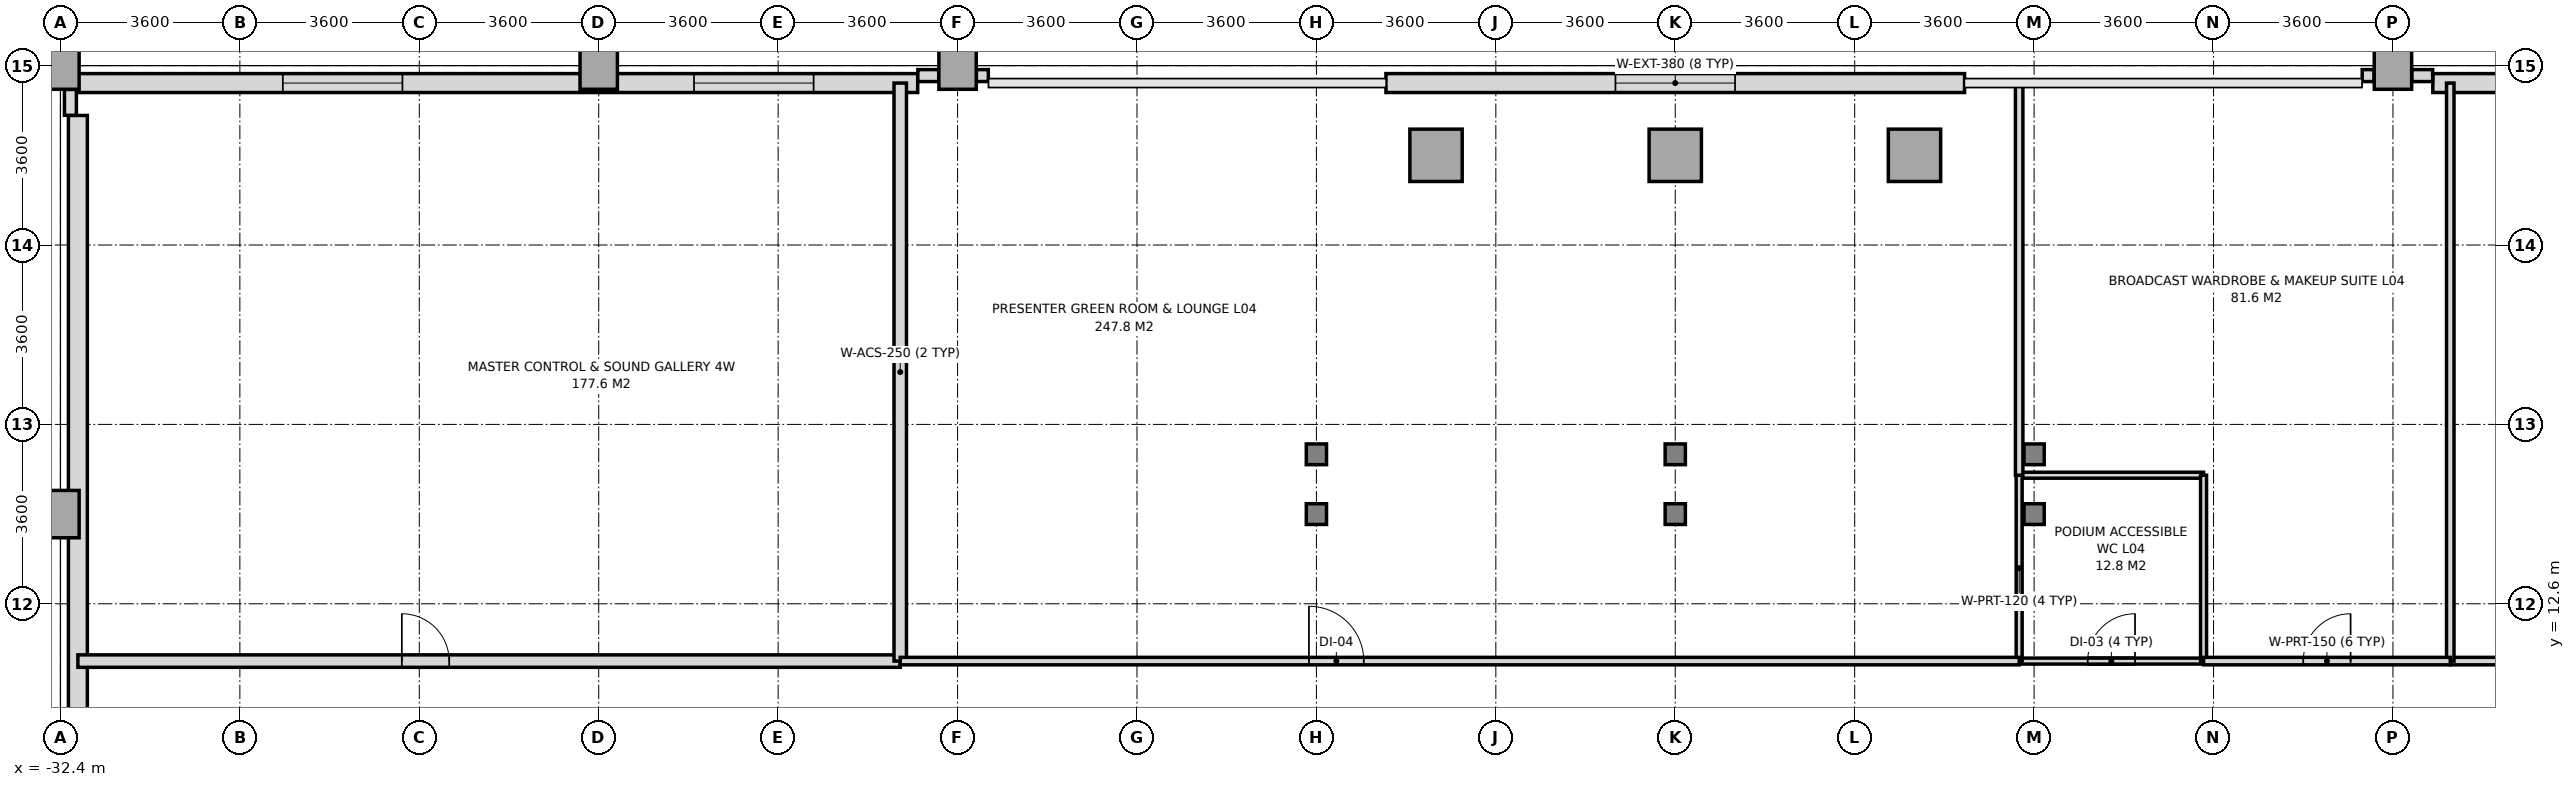
"""IFC4 building model, lengths in metres.
Left out: names, types, materials, properties, quantities, classifications, styles, units other than length and angle.
Written with IfcOpenShell. Run it as: python <this file> out.ifc"""

import sys

from ifc_helpers import new_model, si_unit, direction, frame, frame_2d, origin, origin_2d, place, context, subcontext, project, spatial, rectangle, i_section, extrude, source, transform, mapped, element, fill, save


model = new_model("IFC4")
c1 = context("Model", 3, precision=1e-05, world=origin(), true_north=direction((0.0, 1.0)))
c2 = subcontext(c1, "Body", "Model", "MODEL_VIEW")
j1 = project(units=[si_unit("LENGTHUNIT", "METRE"), si_unit("PLANEANGLEUNIT", "RADIAN")], contexts=[c1])
p1 = place(None, origin())
s1 = spatial("IfcSite", under=j1, at=p1, CompositionType="ELEMENT")
p2 = place(p1, origin())
s2 = spatial("IfcBuilding", under=s1, at=p2, CompositionType="ELEMENT")
p3 = place(p2, frame((0.0, 0.0, 20.4)))
s3 = spatial("IfcBuildingStorey", under=s2, at=p3, CompositionType="ELEMENT", Elevation=20.4)
m1 = source(origin(), c2, "Body", "SweptSolid", [
    extrude(rectangle(XDim=0.75, YDim=0.95, at=origin_2d()), origin(), (0.0, 0.0, 1.0), 4.48),
])
for number, where, z_axis, x_axis in (
    (1, (-32.4, 14.4, 0.0), (0.0, 0.0, 1.0), (1.0, 0.0, 0.0)),
    (2, (-32.4, 23.4, 0.0), (0.0, 0.0, 1.0), (1.0, 0.0, 0.0)),
    (3, (-21.6, 23.4, 0.0), (0.0, 0.0, 1.0), (1.0, 0.0, 0.0)),
    (4, (-14.4, 23.4, 0.0), (0.0, 0.0, 1.0), (1.0, 0.0, 0.0)),
):
    element("IfcColumn", number, at=place(p3, frame(where, z_axis=z_axis, x_axis=x_axis)), inside=s3, PredefinedType="COLUMN", context=c2, shape_type="MappedRepresentation", body=[
        mapped(m1, transform((0.0, 0.0, 0.0), x_axis=(1.0, 0.0, 0.0), y_axis=(0.0, 1.0, 0.0), z_axis=(0.0, 0.0, 1.0), scale=1.0)),
    ])
m2 = source(origin(), c2, "Body", "SweptSolid", [
    extrude(i_section(OverallWidth=0.406, OverallDepth=0.416, WebThickness=0.024, FlangeThickness=0.039, at=origin_2d()), origin(), (0.0, 0.0, 1.0), 4.48),
])
for number, where, z_axis, x_axis in (
    (5, (-7.2, 14.4, 0.0), (0.0, 0.0, 1.0), (1.0, 0.0, 0.0)),
    (6, (-7.2, 15.6, 0.0), (0.0, 0.0, 1.0), (1.0, 0.0, 0.0)),
):
    element("IfcColumn", number, at=place(p3, frame(where, z_axis=z_axis, x_axis=x_axis)), inside=s3, PredefinedType="COLUMN", context=c2, shape_type="MappedRepresentation", body=[
        mapped(m2, transform((0.0, 0.0, 0.0), x_axis=(1.0, 0.0, 0.0), y_axis=(0.0, 1.0, 0.0), z_axis=(0.0, 0.0, 1.0), scale=1.0)),
    ])
m3 = source(origin(), c2, "Body", "SweptSolid", [
    extrude(rectangle(XDim=1.05, YDim=1.05, at=origin_2d()), origin(), (0.0, 0.0, 1.0), 4.48),
])
p4 = place(p3, frame((-4.8, 21.6, 0.0), z_axis=(0.0, 0.0, 1.0), x_axis=(1.0, 0.0, 0.0)))
e7 = element("IfcColumn", 7, at=p4, inside=s3, PredefinedType="COLUMN", context=c2, shape_type="MappedRepresentation", body=[
    mapped(m3, transform((0.0, 0.0, 0.0), x_axis=(1.0, 0.0, 0.0), y_axis=(0.0, 1.0, 0.0), z_axis=(0.0, 0.0, 1.0), scale=1.0)),
])
for number, where, z_axis, x_axis in (
    (8, (0.0, 14.4, 0.0), (0.0, 0.0, 1.0), (1.0, 0.0, 0.0)),
    (9, (0.0, 15.6, 0.0), (0.0, 0.0, 1.0), (1.0, 0.0, 0.0)),
):
    element("IfcColumn", number, at=place(p3, frame(where, z_axis=z_axis, x_axis=x_axis)), inside=s3, PredefinedType="COLUMN", context=c2, shape_type="MappedRepresentation", body=[
        mapped(m2, transform((0.0, 0.0, 0.0), x_axis=(1.0, 0.0, 0.0), y_axis=(0.0, 1.0, 0.0), z_axis=(0.0, 0.0, 1.0), scale=1.0)),
    ])
for number, where, z_axis, x_axis in (
    (10, (0.0, 21.6, 0.0), (0.0, 0.0, 1.0), (1.0, 0.0, 0.0)),
    (11, (4.8, 21.6, 0.0), (0.0, 0.0, 1.0), (1.0, 0.0, 0.0)),
):
    element("IfcColumn", number, at=place(p3, frame(where, z_axis=z_axis, x_axis=x_axis)), inside=s3, PredefinedType="COLUMN", context=c2, shape_type="MappedRepresentation", body=[
        mapped(m3, transform((0.0, 0.0, 0.0), x_axis=(1.0, 0.0, 0.0), y_axis=(0.0, 1.0, 0.0), z_axis=(0.0, 0.0, 1.0), scale=1.0)),
    ])
for number, where, z_axis, x_axis in (
    (12, (7.2, 14.4, 0.0), (0.0, 0.0, 1.0), (1.0, 0.0, 0.0)),
    (13, (7.2, 15.6, 0.0), (0.0, 0.0, 1.0), (1.0, 0.0, 0.0)),
):
    element("IfcColumn", number, at=place(p3, frame(where, z_axis=z_axis, x_axis=x_axis)), inside=s3, PredefinedType="COLUMN", context=c2, shape_type="MappedRepresentation", body=[
        mapped(m2, transform((0.0, 0.0, 0.0), x_axis=(1.0, 0.0, 0.0), y_axis=(0.0, 1.0, 0.0), z_axis=(0.0, 0.0, 1.0), scale=1.0)),
    ])
p5 = place(p3, frame((14.4, 23.4, 0.0), z_axis=(0.0, 0.0, 1.0), x_axis=(1.0, 0.0, 0.0)))
e14 = element("IfcColumn", 14, at=p5, inside=s3, PredefinedType="COLUMN", context=c2, shape_type="MappedRepresentation", body=[
    mapped(m1, transform((0.0, 0.0, 0.0), x_axis=(1.0, 0.0, 0.0), y_axis=(0.0, 1.0, 0.0), z_axis=(0.0, 0.0, 1.0), scale=1.0)),
])
p6 = place(p3, frame((-32.05, 23.05, 0.0), z_axis=(0.0, 0.0, 1.0), x_axis=(1.0, 0.0, 0.0)))
e15 = element("IfcWall", 15, at=p6, inside=s3, PredefinedType="SOLIDWALL", context=c2, shape_type="SweptSolid", body=[
    extrude(rectangle(XDim=16.85, YDim=0.38, at=frame_2d((8.425, 0.0))), origin(), (0.0, 0.0, 1.0), 4.48),
])
p7 = place(p6, frame((4.112, 0.0, 0.95)))
e16 = element("IfcOpeningElement", 16, at=p7, cuts=e15, PredefinedType="OPENING", context=c2, shape_type="SweptSolid", body=[
    extrude(rectangle(XDim=2.4, YDim=2.2, at=frame_2d((1.2, 1.1))), frame((0.0, 0.2, 0.0), z_axis=(0.0, -1.0, 0.0), x_axis=(1.0, 0.0, 0.0)), (0.0, 0.0, 1.0), 0.4),
])
p8 = place(p6, frame((12.362, 0.0, 0.95)))
e17 = element("IfcOpeningElement", 17, at=p8, cuts=e15, PredefinedType="OPENING", context=c2, shape_type="SweptSolid", body=[
    extrude(rectangle(XDim=2.4, YDim=2.2, at=frame_2d((1.2, 1.1))), frame((0.0, 0.2, 0.0), z_axis=(0.0, -1.0, 0.0), x_axis=(1.0, 0.0, 0.0)), (0.0, 0.0, 1.0), 0.4),
])
p9 = place(p3, frame((15.2, 23.05, 0.0), z_axis=(0.0, 0.0, 1.0), x_axis=(1.0, 0.0, 0.0)))
e18 = element("IfcWall", 18, at=p9, inside=s3, PredefinedType="SOLIDWALL", context=c2, shape_type="SweptSolid", body=[
    extrude(rectangle(XDim=16.85, YDim=0.38, at=frame_2d((8.425, 0.0))), origin(), (0.0, 0.0, 1.0), 4.48),
])
p10 = place(p9, frame((2.088, 0.0, 0.95)))
e19 = element("IfcOpeningElement", 19, at=p10, cuts=e18, PredefinedType="OPENING", context=c2, shape_type="SweptSolid", body=[
    extrude(rectangle(XDim=2.4, YDim=2.2, at=frame_2d((1.2, 1.1))), frame((0.0, 0.2, 0.0), z_axis=(0.0, -1.0, 0.0), x_axis=(1.0, 0.0, 0.0)), (0.0, 0.0, 1.0), 0.4),
])
p11 = place(p9, frame((10.338, 0.0, 0.95)))
e20 = element("IfcOpeningElement", 20, at=p11, cuts=e18, PredefinedType="OPENING", context=c2, shape_type="SweptSolid", body=[
    extrude(rectangle(XDim=2.4, YDim=2.2, at=frame_2d((1.2, 1.1))), frame((0.0, 0.2, 0.0), z_axis=(0.0, -1.0, 0.0), x_axis=(1.0, 0.0, 0.0)), (0.0, 0.0, 1.0), 0.4),
])
p12 = place(p3, frame((-32.05, -18.8, 0.0), z_axis=(0.0, 0.0, 1.0), x_axis=(0.0, 1.0, 0.0)))
e21 = element("IfcWall", 21, at=p12, inside=s3, PredefinedType="SOLIDWALL", context=c2, shape_type="SweptSolid", body=[
    extrude(rectangle(XDim=41.2, YDim=0.38, at=frame_2d((20.6, 0.0))), origin(), (0.0, 0.0, 1.0), 4.48),
])
p13 = place(p12, frame((5.9, 0.0, 0.95)))
e22 = element("IfcOpeningElement", 22, at=p13, cuts=e21, PredefinedType="OPENING", context=c2, shape_type="SweptSolid", body=[
    extrude(rectangle(XDim=2.4, YDim=2.2, at=frame_2d((1.2, 1.1))), frame((0.0, 0.2, 0.0), z_axis=(0.0, -1.0, 0.0), x_axis=(1.0, 0.0, 0.0)), (0.0, 0.0, 1.0), 0.4),
])
p14 = place(p12, frame((13.1, 0.0, 0.95)))
e23 = element("IfcOpeningElement", 23, at=p14, cuts=e21, PredefinedType="OPENING", context=c2, shape_type="SweptSolid", body=[
    extrude(rectangle(XDim=2.4, YDim=2.2, at=frame_2d((1.2, 1.1))), frame((0.0, 0.2, 0.0), z_axis=(0.0, -1.0, 0.0), x_axis=(1.0, 0.0, 0.0)), (0.0, 0.0, 1.0), 0.4),
])
p15 = place(p12, frame((22.1, 0.0, 0.95)))
e24 = element("IfcOpeningElement", 24, at=p15, cuts=e21, PredefinedType="OPENING", context=c2, shape_type="SweptSolid", body=[
    extrude(rectangle(XDim=2.4, YDim=2.2, at=frame_2d((1.2, 1.1))), frame((0.0, 0.2, 0.0), z_axis=(0.0, -1.0, 0.0), x_axis=(1.0, 0.0, 0.0)), (0.0, 0.0, 1.0), 0.4),
])
p16 = place(p3, frame((-5.805, 23.05, 0.0), z_axis=(0.0, 0.0, 1.0), x_axis=(1.0, 0.0, 0.0)))
e25 = element("IfcWall", 25, at=p16, inside=s3, PredefinedType="SOLIDWALL", context=c2, shape_type="SweptSolid", body=[
    extrude(rectangle(XDim=11.61, YDim=0.38, at=frame_2d((5.805, 0.0))), origin(), (0.0, 0.0, 1.0), 4.48),
])
p17 = place(p16, frame((4.605, 0.0, 0.95)))
e26 = element("IfcOpeningElement", 26, at=p17, cuts=e25, PredefinedType="OPENING", context=c2, shape_type="SweptSolid", body=[
    extrude(rectangle(XDim=2.4, YDim=2.2, at=frame_2d((1.2, 1.1))), frame((0.0, 0.2, 0.0), z_axis=(0.0, -1.0, 0.0), x_axis=(1.0, 0.0, 0.0)), (0.0, 0.0, 1.0), 0.4),
])
p18 = place(p3, frame((-32.2, 22.403, 0.0), z_axis=(0.0, 0.0, 1.0), x_axis=(0.0, 1.0, 0.0)))
e27 = element("IfcWall", 27, at=p18, inside=s3, PredefinedType="PARAPET", context=c2, shape_type="SweptSolid", body=[
    extrude(rectangle(XDim=0.519, YDim=0.24, at=frame_2d((0.26, 0.0))), origin(), (0.0, 0.0, 1.0), 1.15),
])
p19 = place(p3, frame((-15.197, 23.2, 0.0), z_axis=(0.0, 0.0, 1.0), x_axis=(1.0, 0.0, 0.0)))
e28 = element("IfcWall", 28, at=p19, inside=s3, PredefinedType="PARAPET", context=c2, shape_type="SweptSolid", body=[
    extrude(rectangle(XDim=0.419, YDim=0.24, at=frame_2d((0.209, 0.0))), origin(), (0.0, 0.0, 1.0), 1.15),
])
for number, where, z_axis, x_axis in (
    (29, (-14.022, 23.2, 0.0), (0.0, 0.0, 1.0), (1.0, 0.0, 0.0)),
    (30, (13.783, 23.2, 0.0), (0.0, 0.0, 1.0), (1.0, 0.0, 0.0)),
):
    element("IfcWall", number, at=place(p3, frame(where, z_axis=z_axis, x_axis=x_axis)), inside=s3, PredefinedType="PARAPET", context=c2, shape_type="SweptSolid", body=[
        extrude(rectangle(XDim=0.239, YDim=0.24, at=frame_2d((0.12, 0.0))), origin(), (0.0, 0.0, 1.0), 1.15),
    ])
p20 = place(p3, frame((14.778, 23.2, 0.0), z_axis=(0.0, 0.0, 1.0), x_axis=(1.0, 0.0, 0.0)))
e31 = element("IfcWall", 31, at=p20, inside=s3, PredefinedType="PARAPET", context=c2, shape_type="SweptSolid", body=[
    extrude(rectangle(XDim=0.419, YDim=0.24, at=frame_2d((0.209, 0.0))), origin(), (0.0, 0.0, 1.0), 1.15),
])
p21 = place(p3, frame((6.9, 11.45, 0.0), z_axis=(0.0, 0.0, 1.0), x_axis=(1.0, 0.0, 0.0)))
e32 = element("IfcWall", 32, at=p21, inside=s3, PredefinedType="PARTITIONING", context=c2, shape_type="SweptSolid", body=[
    extrude(rectangle(XDim=3.7, YDim=0.12, at=frame_2d((1.85, 0.0))), origin(), (0.0, 0.0, 1.0), 4.48),
])
p22 = place(p21, frame((1.375, 0.0, 0.0)))
e33 = element("IfcOpeningElement", 33, at=p22, cuts=e32, PredefinedType="OPENING", context=c2, shape_type="SweptSolid", body=[
    extrude(rectangle(XDim=0.95, YDim=2.15, at=frame_2d((0.475, 1.075))), frame((0.0, 0.07, 0.0), z_axis=(0.0, -1.0, 0.0), x_axis=(1.0, 0.0, 0.0)), (0.0, 0.0, 1.0), 0.14),
])
p23 = place(p3, frame((6.9, 15.18, 0.0), z_axis=(0.0, 0.0, 1.0), x_axis=(1.0, 0.0, 0.0)))
e34 = element("IfcWall", 34, at=p23, inside=s3, PredefinedType="PARTITIONING", context=c2, shape_type="SweptSolid", body=[
    extrude(rectangle(XDim=3.7, YDim=0.12, at=frame_2d((1.85, 0.0))), origin(), (0.0, 0.0, 1.0), 3.13),
])
p24 = place(p3, frame((6.9, 11.45, 0.0), z_axis=(0.0, 0.0, 1.0), x_axis=(0.0, 1.0, 0.0)))
e35 = element("IfcWall", 35, at=p24, inside=s3, PredefinedType="PARTITIONING", context=c2, shape_type="SweptSolid", body=[
    extrude(rectangle(XDim=3.73, YDim=0.12, at=frame_2d((1.865, 0.0))), origin(), (0.0, 0.0, 1.0), 3.13),
])
p25 = place(p3, frame((10.6, 11.45, 0.0), z_axis=(0.0, 0.0, 1.0), x_axis=(0.0, 1.0, 0.0)))
e36 = element("IfcWall", 36, at=p25, inside=s3, PredefinedType="PARTITIONING", context=c2, shape_type="SweptSolid", body=[
    extrude(rectangle(XDim=3.73, YDim=0.12, at=frame_2d((1.865, 0.0))), origin(), (0.0, 0.0, 1.0), 4.48),
])
p26 = place(p3, frame((-32.05, 11.45, 0.0), z_axis=(0.0, 0.0, 1.0), x_axis=(1.0, 0.0, 0.0)))
e37 = element("IfcWall", 37, at=p26, inside=s3, PredefinedType="SOLIDWALL", context=c2, shape_type="SweptSolid", body=[
    extrude(rectangle(XDim=16.5, YDim=0.25, at=frame_2d((8.25, 0.0))), origin(), (0.0, 0.0, 1.0), 4.48),
])
p27 = place(p26, frame((6.5, 0.0, 0.0)))
e38 = element("IfcOpeningElement", 38, at=p27, cuts=e37, PredefinedType="OPENING", context=c2, shape_type="SweptSolid", body=[
    extrude(rectangle(XDim=0.95, YDim=2.15, at=frame_2d((0.475, 1.075))), frame((0.0, 0.135, 0.0), z_axis=(0.0, -1.0, 0.0), x_axis=(1.0, 0.0, 0.0)), (0.0, 0.0, 1.0), 0.27),
])
p28 = place(p3, frame((-15.55, 11.45, 0.0), z_axis=(0.0, 0.0, 1.0), x_axis=(0.0, 1.0, 0.0)))
e39 = element("IfcWall", 39, at=p28, inside=s3, PredefinedType="SOLIDWALL", context=c2, shape_type="SweptSolid", body=[
    extrude(rectangle(XDim=11.6, YDim=0.25, at=frame_2d((5.8, 0.0))), origin(), (0.0, 0.0, 1.0), 4.48),
])
p29 = place(p3, frame((15.55, 11.45, 0.0), z_axis=(0.0, 0.0, 1.0), x_axis=(1.0, 0.0, 0.0)))
e40 = element("IfcWall", 40, at=p29, inside=s3, PredefinedType="PARTITIONING", context=c2, shape_type="SweptSolid", body=[
    extrude(rectangle(XDim=16.5, YDim=0.15, at=frame_2d((8.25, 0.0))), origin(), (0.0, 0.0, 1.0), 4.48),
])
p30 = place(p29, frame((6.5, 0.0, 0.0)))
e41 = element("IfcOpeningElement", 41, at=p30, cuts=e40, PredefinedType="OPENING", context=c2, shape_type="SweptSolid", body=[
    extrude(rectangle(XDim=0.95, YDim=2.15, at=frame_2d((0.475, 1.075))), frame((0.0, 0.085, 0.0), z_axis=(0.0, -1.0, 0.0), x_axis=(1.0, 0.0, 0.0)), (0.0, 0.0, 1.0), 0.17),
])
p31 = place(p3, frame((15.55, 11.45, 0.0), z_axis=(0.0, 0.0, 1.0), x_axis=(0.0, 1.0, 0.0)))
e42 = element("IfcWall", 42, at=p31, inside=s3, PredefinedType="PARTITIONING", context=c2, shape_type="SweptSolid", body=[
    extrude(rectangle(XDim=11.6, YDim=0.15, at=frame_2d((5.8, 0.0))), origin(), (0.0, 0.0, 1.0), 4.48),
])
p32 = place(p3, frame((-15.55, 11.45, 0.0), z_axis=(0.0, 0.0, 1.0), x_axis=(1.0, 0.0, 0.0)))
e43 = element("IfcWall", 43, at=p32, inside=s3, PredefinedType="PARTITIONING", context=c2, shape_type="SweptSolid", body=[
    extrude(rectangle(XDim=22.45, YDim=0.15, at=frame_2d((11.225, 0.0))), origin(), (0.0, 0.0, 1.0), 4.48),
])
p33 = place(p32, frame((8.2, 0.0, 0.0)))
e44 = element("IfcOpeningElement", 44, at=p33, cuts=e43, PredefinedType="OPENING", context=c2, shape_type="SweptSolid", body=[
    extrude(rectangle(XDim=1.1, YDim=2.2, at=frame_2d((0.55, 1.1))), frame((0.0, 0.085, 0.0), z_axis=(0.0, -1.0, 0.0), x_axis=(1.0, 0.0, 0.0)), (0.0, 0.0, 1.0), 0.17),
])
p34 = place(p3, frame((6.9, 15.18, 0.0), z_axis=(0.0, 0.0, 1.0), x_axis=(0.0, 1.0, 0.0)))
e45 = element("IfcWall", 45, at=p34, inside=s3, PredefinedType="PARTITIONING", context=c2, shape_type="SweptSolid", body=[
    extrude(rectangle(XDim=7.87, YDim=0.15, at=frame_2d((3.935, 0.0))), origin(), (0.0, 0.0, 1.0), 3.13),
])
p35 = place(p3, frame((10.6, 11.45, 0.0), z_axis=(0.0, 0.0, 1.0), x_axis=(1.0, 0.0, 0.0)))
e46 = element("IfcWall", 46, at=p35, inside=s3, PredefinedType="PARTITIONING", context=c2, shape_type="SweptSolid", body=[
    extrude(rectangle(XDim=4.95, YDim=0.15, at=frame_2d((2.475, 0.0))), origin(), (0.0, 0.0, 1.0), 4.48),
])
p36 = place(p35, frame((2.0, 0.0, 0.0)))
e47 = element("IfcOpeningElement", 47, at=p36, cuts=e46, PredefinedType="OPENING", context=c2, shape_type="SweptSolid", body=[
    extrude(rectangle(XDim=0.95, YDim=2.15, at=frame_2d((0.475, 1.075))), frame((0.0, 0.085, 0.0), z_axis=(0.0, -1.0, 0.0), x_axis=(1.0, 0.0, 0.0)), (0.0, 0.0, 1.0), 0.17),
])
m4 = source(origin(), c2, "Body", "SweptSolid", [
    extrude(rectangle(XDim=2.4, YDim=2.2, at=frame_2d((1.2, 1.1))), frame((0.0, 0.03, 0.0), z_axis=(0.0, -1.0, 0.0), x_axis=(1.0, 0.0, 0.0)), (0.0, 0.0, 1.0), 0.06),
])
p37 = place(p7, origin())
e48 = element("IfcWindow", 48, at=p37, inside=s3, PartitioningType="SINGLE_PANEL", PredefinedType="WINDOW", context=c2, shape_type="MappedRepresentation", body=[
    mapped(m4, transform((0.0, 0.0, 0.0), x_axis=(1.0, 0.0, 0.0), y_axis=(0.0, 1.0, 0.0), z_axis=(0.0, 0.0, 1.0), scale=1.0)),
])
fill(e16, e48)
p38 = place(p8, origin())
e49 = element("IfcWindow", 49, at=p38, inside=s3, PartitioningType="SINGLE_PANEL", PredefinedType="WINDOW", context=c2, shape_type="MappedRepresentation", body=[
    mapped(m4, transform((0.0, 0.0, 0.0), x_axis=(1.0, 0.0, 0.0), y_axis=(0.0, 1.0, 0.0), z_axis=(0.0, 0.0, 1.0), scale=1.0)),
])
fill(e17, e49)
p39 = place(p17, origin())
e50 = element("IfcWindow", 50, at=p39, inside=s3, PartitioningType="SINGLE_PANEL", PredefinedType="WINDOW", context=c2, shape_type="MappedRepresentation", body=[
    mapped(m4, transform((0.0, 0.0, 0.0), x_axis=(1.0, 0.0, 0.0), y_axis=(0.0, 1.0, 0.0), z_axis=(0.0, 0.0, 1.0), scale=1.0)),
])
fill(e26, e50)
m5 = source(origin(), c2, "Body", "SweptSolid", [
    extrude(rectangle(XDim=0.95, YDim=2.15, at=frame_2d((0.475, 1.075))), frame((0.0, 0.025, 0.0), z_axis=(0.0, -1.0, 0.0), x_axis=(1.0, 0.0, 0.0)), (0.0, 0.0, 1.0), 0.05),
])
p40 = place(p22, origin())
e51 = element("IfcDoor", 51, at=p40, inside=s3, OperationType="SINGLE_SWING_RIGHT", PredefinedType="DOOR", context=c2, shape_type="MappedRepresentation", body=[
    mapped(m5, transform((0.0, 0.0, 0.0), x_axis=(1.0, 0.0, 0.0), y_axis=(0.0, 1.0, 0.0), z_axis=(0.0, 0.0, 1.0), scale=1.0)),
])
fill(e33, e51)
p41 = place(p27, origin())
e52 = element("IfcDoor", 52, at=p41, inside=s3, OperationType="SINGLE_SWING_LEFT", PredefinedType="DOOR", context=c2, shape_type="MappedRepresentation", body=[
    mapped(m5, transform((0.0, 0.0, 0.0), x_axis=(1.0, 0.0, 0.0), y_axis=(0.0, 1.0, 0.0), z_axis=(0.0, 0.0, 1.0), scale=1.0)),
])
fill(e38, e52)
m6 = source(origin(), c2, "Body", "SweptSolid", [
    extrude(rectangle(XDim=1.1, YDim=2.2, at=frame_2d((0.55, 1.1))), frame((0.0, 0.025, 0.0), z_axis=(0.0, -1.0, 0.0), x_axis=(1.0, 0.0, 0.0)), (0.0, 0.0, 1.0), 0.05),
])
p42 = place(p33, origin())
e53 = element("IfcDoor", 53, at=p42, inside=s3, OperationType="SINGLE_SWING_LEFT", PredefinedType="DOOR", context=c2, shape_type="MappedRepresentation", body=[
    mapped(m6, transform((0.0, 0.0, 0.0), x_axis=(1.0, 0.0, 0.0), y_axis=(0.0, 1.0, 0.0), z_axis=(0.0, 0.0, 1.0), scale=1.0)),
])
fill(e44, e53)
p43 = place(p36, origin())
e54 = element("IfcDoor", 54, at=p43, inside=s3, OperationType="SINGLE_SWING_RIGHT", PredefinedType="DOOR", context=c2, shape_type="MappedRepresentation", body=[
    mapped(m5, transform((0.0, 0.0, 0.0), x_axis=(1.0, 0.0, 0.0), y_axis=(0.0, 1.0, 0.0), z_axis=(0.0, 0.0, 1.0), scale=1.0)),
])
fill(e47, e54)
save(model, sys.argv[1])
